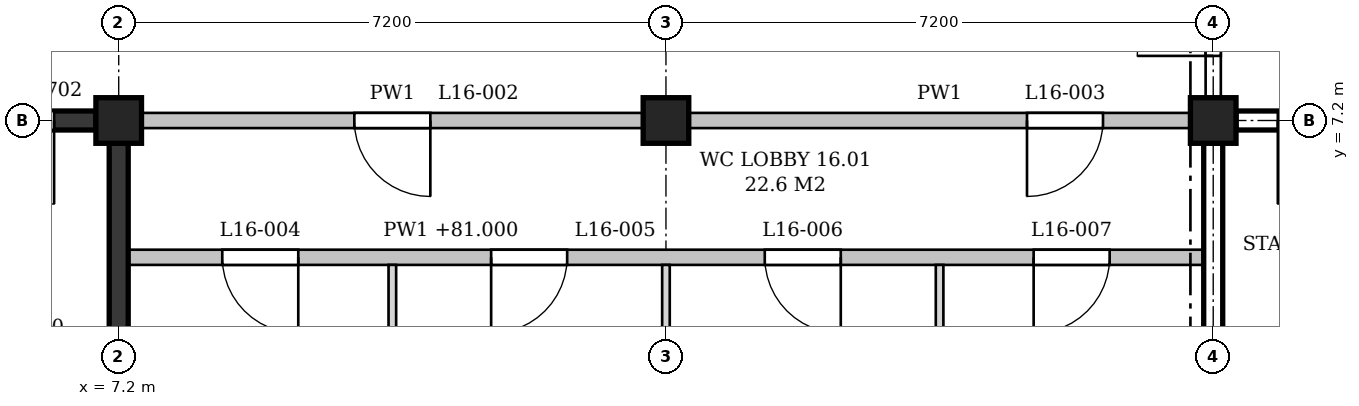
"""IFC4 building model, lengths in metres.
Left out: names, types, materials, properties, quantities, classifications, styles, units other than length and angle.
Written with IfcOpenShell. Run it as: python <this file> out.ifc"""

import sys

from ifc_helpers import new_model, si_unit, direction, frame, frame_2d, origin, origin_2d, place, context, subcontext, project, spatial, polyline, rectangle, outline, extrude, element, fill, save


model = new_model("IFC4")
c1 = context("Model", 3, precision=1e-05, world=origin(), true_north=direction((0.0, 1.0)))
c2 = subcontext(c1, "Body", "Model", "MODEL_VIEW")
j1 = project(units=[si_unit("LENGTHUNIT", "METRE"), si_unit("PLANEANGLEUNIT", "RADIAN")], contexts=[c1])
p1 = place(None, origin())
s1 = spatial("IfcSite", under=j1, at=p1, CompositionType="ELEMENT")
p2 = place(p1, origin())
s2 = spatial("IfcBuilding", under=s1, at=p2, CompositionType="ELEMENT")
p3 = place(p2, frame((0.0, 0.0, 76.8)))
s3 = spatial("IfcBuildingStorey", under=s2, at=p3, CompositionType="ELEMENT", Elevation=76.8)
for number, where, z_axis, x_axis in (
    (1, (7.2, 7.2, 0.0), (0.0, 0.0, 1.0), (1.0, 0.0, 0.0)),
    (2, (14.4, 7.2, 0.0), (0.0, 0.0, 1.0), (1.0, 0.0, 0.0)),
    (3, (21.6, 7.2, 0.0), (0.0, 0.0, 1.0), (1.0, 0.0, 0.0)),
):
    element("IfcColumn", number, at=place(p3, frame(where, z_axis=z_axis, x_axis=x_axis)), inside=s3, PredefinedType="COLUMN", context=c2, shape_type="SweptSolid", body=[
        extrude(rectangle(XDim=0.6, YDim=0.6, at=origin_2d()), origin(), (0.0, 0.0, 1.0), 4.5),
    ])
p4 = place(p3, frame((0.3, 7.2, 0.0), z_axis=(0.0, 0.0, 1.0), x_axis=(1.0, 0.0, 0.0)))
e4 = element("IfcWall", 4, at=p4, inside=s3, PredefinedType="SHEAR", context=c2, shape_type="SweptSolid", body=[
    extrude(rectangle(XDim=6.6, YDim=0.25, at=frame_2d((3.3, 0.0))), origin(), (0.0, 0.0, 1.0), 3.55),
])
p5 = place(p4, frame((4.95, 0.0, 0.0)))
e5 = element("IfcOpeningElement", 5, at=p5, cuts=e4, PredefinedType="OPENING", context=c2, shape_type="SweptSolid", body=[
    extrude(rectangle(XDim=1.1, YDim=2.1, at=frame_2d((0.55, 1.05))), frame((0.0, 0.135, 0.0), z_axis=(0.0, -1.0, 0.0), x_axis=(1.0, 0.0, 0.0)), (0.0, 0.0, 1.0), 0.27),
])
p6 = place(p3, frame((7.2, 0.3, 0.0), z_axis=(0.0, 0.0, 1.0), x_axis=(0.0, 1.0, 0.0)))
e6 = element("IfcWall", 6, at=p6, inside=s3, PredefinedType="SHEAR", context=c2, shape_type="SweptSolid", body=[
    extrude(rectangle(XDim=6.6, YDim=0.25, at=frame_2d((3.3, 0.0))), origin(), (0.0, 0.0, 1.0), 3.55),
])
p7 = place(p3, frame((21.9, 7.2, 0.0), z_axis=(0.0, 0.0, 1.0), x_axis=(1.0, 0.0, 0.0)))
e7 = element("IfcWall", 7, at=p7, inside=s3, PredefinedType="SHEAR", context=c2, shape_type="SweptSolid", body=[
    extrude(rectangle(XDim=6.6, YDim=0.25, at=frame_2d((3.3, 0.0))), origin(), (0.0, 0.0, 1.0), 3.55),
])
p8 = place(p7, frame((0.55, 0.0, 0.0)))
e8 = element("IfcOpeningElement", 8, at=p8, cuts=e7, PredefinedType="OPENING", context=c2, shape_type="SweptSolid", body=[
    extrude(rectangle(XDim=1.1, YDim=2.1, at=frame_2d((0.55, 1.05))), frame((0.0, 0.135, 0.0), z_axis=(0.0, -1.0, 0.0), x_axis=(1.0, 0.0, 0.0)), (0.0, 0.0, 1.0), 0.27),
])
p9 = place(p3, frame((21.6, 0.3, 0.0), z_axis=(0.0, 0.0, 1.0), x_axis=(0.0, 1.0, 0.0)))
e9 = element("IfcWall", 9, at=p9, inside=s3, PredefinedType="SHEAR", context=c2, shape_type="SweptSolid", body=[
    extrude(rectangle(XDim=6.6, YDim=0.25, at=frame_2d((3.3, 0.0))), origin(), (0.0, 0.0, 1.0), 3.55),
])
p10 = place(p3, frame((7.325, 5.4, 0.0), z_axis=(0.0, 0.0, 1.0), x_axis=(1.0, 0.0, 0.0)))
e10 = element("IfcWall", 10, at=p10, inside=s3, PredefinedType="PARTITIONING", context=c2, shape_type="SweptSolid", body=[
    extrude(outline(polyline([(0.0, 0.0), (14.15, 0.0), (14.15, 3.55), (14.05, 3.55), (14.05, 4.2), (7.3, 4.2), (7.3, 3.55), (6.85, 3.55), (6.85, 4.2), (0.1, 4.2), (0.1, 3.55), (0.0, 3.55), (0.0, 0.0)])), frame((0.0, 0.1, 0.0), z_axis=(0.0, -1.0, 0.0), x_axis=(1.0, 0.0, 0.0)), (0.0, 0.0, 1.0), 0.2),
])
p11 = place(p10, frame((1.238, 0.0, 0.0)))
e11 = element("IfcOpeningElement", 11, at=p11, cuts=e10, PredefinedType="OPENING", context=c2, shape_type="SweptSolid", body=[
    extrude(rectangle(XDim=1.0, YDim=2.1, at=frame_2d((0.5, 1.05))), frame((0.0, 0.11, 0.0), z_axis=(0.0, -1.0, 0.0), x_axis=(1.0, 0.0, 0.0)), (0.0, 0.0, 1.0), 0.22),
])
p12 = place(p10, frame((4.775, 0.0, 0.0)))
e12 = element("IfcOpeningElement", 12, at=p12, cuts=e10, PredefinedType="OPENING", context=c2, shape_type="SweptSolid", body=[
    extrude(rectangle(XDim=1.0, YDim=2.1, at=frame_2d((0.5, 1.05))), frame((0.0, 0.11, 0.0), z_axis=(0.0, -1.0, 0.0), x_axis=(1.0, 0.0, 0.0)), (0.0, 0.0, 1.0), 0.22),
])
p13 = place(p10, frame((8.375, 0.0, 0.0)))
e13 = element("IfcOpeningElement", 13, at=p13, cuts=e10, PredefinedType="OPENING", context=c2, shape_type="SweptSolid", body=[
    extrude(rectangle(XDim=1.0, YDim=2.1, at=frame_2d((0.5, 1.05))), frame((0.0, 0.11, 0.0), z_axis=(0.0, -1.0, 0.0), x_axis=(1.0, 0.0, 0.0)), (0.0, 0.0, 1.0), 0.22),
])
p14 = place(p10, frame((11.913, 0.0, 0.0)))
e14 = element("IfcOpeningElement", 14, at=p14, cuts=e10, PredefinedType="OPENING", context=c2, shape_type="SweptSolid", body=[
    extrude(rectangle(XDim=1.0, YDim=2.1, at=frame_2d((0.5, 1.05))), frame((0.0, 0.11, 0.0), z_axis=(0.0, -1.0, 0.0), x_axis=(1.0, 0.0, 0.0)), (0.0, 0.0, 1.0), 0.22),
])
p15 = place(p3, frame((7.5, 7.2, 0.0), z_axis=(0.0, 0.0, 1.0), x_axis=(1.0, 0.0, 0.0)))
e15 = element("IfcWall", 15, at=p15, inside=s3, PredefinedType="PARTITIONING", context=c2, shape_type="SweptSolid", body=[
    extrude(rectangle(XDim=6.6, YDim=0.2, at=frame_2d((3.3, 0.0))), origin(), (0.0, 0.0, 1.0), 3.55),
])
p16 = place(p15, frame((2.8, 0.0, 0.0)))
e16 = element("IfcOpeningElement", 16, at=p16, cuts=e15, PredefinedType="OPENING", context=c2, shape_type="SweptSolid", body=[
    extrude(rectangle(XDim=1.0, YDim=2.1, at=frame_2d((0.5, 1.05))), frame((0.0, 0.11, 0.0), z_axis=(0.0, -1.0, 0.0), x_axis=(1.0, 0.0, 0.0)), (0.0, 0.0, 1.0), 0.22),
])
p17 = place(p3, frame((14.7, 7.2, 0.0), z_axis=(0.0, 0.0, 1.0), x_axis=(1.0, 0.0, 0.0)))
e17 = element("IfcWall", 17, at=p17, inside=s3, PredefinedType="PARTITIONING", context=c2, shape_type="SweptSolid", body=[
    extrude(rectangle(XDim=6.6, YDim=0.2, at=frame_2d((3.3, 0.0))), origin(), (0.0, 0.0, 1.0), 3.55),
])
p18 = place(p17, frame((4.45, 0.0, 0.0)))
e18 = element("IfcOpeningElement", 18, at=p18, cuts=e17, PredefinedType="OPENING", context=c2, shape_type="SweptSolid", body=[
    extrude(rectangle(XDim=1.0, YDim=2.1, at=frame_2d((0.5, 1.05))), frame((0.0, 0.11, 0.0), z_axis=(0.0, -1.0, 0.0), x_axis=(1.0, 0.0, 0.0)), (0.0, 0.0, 1.0), 0.22),
])
p19 = place(p3, frame((10.8, 0.15, 0.0), z_axis=(0.0, 0.0, 1.0), x_axis=(0.0, 1.0, 0.0)))
e19 = element("IfcWall", 19, at=p19, inside=s3, PredefinedType="PARTITIONING", context=c2, shape_type="SweptSolid", body=[
    extrude(rectangle(XDim=5.15, YDim=0.1, at=frame_2d((2.575, 0.0))), origin(), (0.0, 0.0, 1.0), 3.55),
])
p20 = place(p3, frame((14.4, 0.3, 0.0), z_axis=(0.0, 0.0, 1.0), x_axis=(0.0, 1.0, 0.0)))
e20 = element("IfcWall", 20, at=p20, inside=s3, PredefinedType="PARTITIONING", context=c2, shape_type="SweptSolid", body=[
    extrude(rectangle(XDim=5.0, YDim=0.1, at=frame_2d((2.5, 0.0))), origin(), (0.0, 0.0, 1.0), 3.55),
])
p21 = place(p3, frame((18.0, 0.15, 0.0), z_axis=(0.0, 0.0, 1.0), x_axis=(0.0, 1.0, 0.0)))
e21 = element("IfcWall", 21, at=p21, inside=s3, PredefinedType="PARTITIONING", context=c2, shape_type="SweptSolid", body=[
    extrude(rectangle(XDim=5.15, YDim=0.1, at=frame_2d((2.575, 0.0))), origin(), (0.0, 0.0, 1.0), 3.55),
])
p22 = place(p3, frame((21.6, 7.5, 0.0), z_axis=(0.0, 0.0, 1.0), x_axis=(0.0, 1.0, 0.0)))
e22 = element("IfcWall", 22, at=p22, inside=s3, PredefinedType="PARTITIONING", context=c2, shape_type="SweptSolid", body=[
    extrude(rectangle(XDim=2.825, YDim=0.2, at=frame_2d((1.413, 0.0))), origin(), (0.0, 0.0, 1.0), 3.55),
])
p23 = place(p22, frame((0.55, 0.0, 0.0)))
e23 = element("IfcOpeningElement", 23, at=p23, cuts=e22, PredefinedType="OPENING", context=c2, shape_type="SweptSolid", body=[
    extrude(rectangle(XDim=1.0, YDim=2.1, at=frame_2d((0.5, 1.05))), frame((0.0, 0.11, 0.0), z_axis=(0.0, -1.0, 0.0), x_axis=(1.0, 0.0, 0.0)), (0.0, 0.0, 1.0), 0.22),
])
p24 = place(p5, frame((1.1, 0.0, 0.0), z_axis=(0.0, 0.0, 1.0), x_axis=(-1.0, 0.0, 0.0)))
e24 = element("IfcDoor", 24, at=p24, inside=s3, OperationType="SINGLE_SWING_LEFT", PredefinedType="DOOR", context=c2, shape_type="SweptSolid", body=[
    extrude(rectangle(XDim=1.1, YDim=2.1, at=frame_2d((0.55, 1.05))), frame((0.0, 0.025, 0.0), z_axis=(0.0, -1.0, 0.0), x_axis=(1.0, 0.0, 0.0)), (0.0, 0.0, 1.0), 0.05),
])
fill(e5, e24)
p25 = place(p8, frame((1.1, 0.0, 0.0), z_axis=(0.0, 0.0, 1.0), x_axis=(-1.0, 0.0, 0.0)))
e25 = element("IfcDoor", 25, at=p25, inside=s3, OperationType="SINGLE_SWING_RIGHT", PredefinedType="DOOR", context=c2, shape_type="SweptSolid", body=[
    extrude(rectangle(XDim=1.1, YDim=2.1, at=frame_2d((0.55, 1.05))), frame((0.0, 0.025, 0.0), z_axis=(0.0, -1.0, 0.0), x_axis=(1.0, 0.0, 0.0)), (0.0, 0.0, 1.0), 0.05),
])
fill(e8, e25)
p26 = place(p23, origin())
e26 = element("IfcDoor", 26, at=p26, inside=s3, OperationType="SINGLE_SWING_LEFT", PredefinedType="DOOR", context=c2, shape_type="SweptSolid", body=[
    extrude(rectangle(XDim=1.0, YDim=2.1, at=frame_2d((0.5, 1.05))), frame((0.0, 0.025, 0.0), z_axis=(0.0, -1.0, 0.0), x_axis=(1.0, 0.0, 0.0)), (0.0, 0.0, 1.0), 0.05),
])
fill(e23, e26)
p27 = place(p16, frame((1.0, 0.0, 0.0), z_axis=(0.0, 0.0, 1.0), x_axis=(-1.0, 0.0, 0.0)))
e27 = element("IfcDoor", 27, at=p27, inside=s3, OperationType="SINGLE_SWING_LEFT", PredefinedType="DOOR", context=c2, shape_type="SweptSolid", body=[
    extrude(rectangle(XDim=1.0, YDim=2.1, at=frame_2d((0.5, 1.05))), frame((0.0, 0.025, 0.0), z_axis=(0.0, -1.0, 0.0), x_axis=(1.0, 0.0, 0.0)), (0.0, 0.0, 1.0), 0.05),
])
fill(e16, e27)
p28 = place(p18, frame((1.0, 0.0, 0.0), z_axis=(0.0, 0.0, 1.0), x_axis=(-1.0, 0.0, 0.0)))
e28 = element("IfcDoor", 28, at=p28, inside=s3, OperationType="SINGLE_SWING_RIGHT", PredefinedType="DOOR", context=c2, shape_type="SweptSolid", body=[
    extrude(rectangle(XDim=1.0, YDim=2.1, at=frame_2d((0.5, 1.05))), frame((0.0, 0.025, 0.0), z_axis=(0.0, -1.0, 0.0), x_axis=(1.0, 0.0, 0.0)), (0.0, 0.0, 1.0), 0.05),
])
fill(e18, e28)
p29 = place(p11, frame((1.0, 0.0, 0.0), z_axis=(0.0, 0.0, 1.0), x_axis=(-1.0, 0.0, 0.0)))
e29 = element("IfcDoor", 29, at=p29, inside=s3, OperationType="SINGLE_SWING_LEFT", PredefinedType="DOOR", context=c2, shape_type="SweptSolid", body=[
    extrude(rectangle(XDim=1.0, YDim=2.1, at=frame_2d((0.5, 1.05))), frame((0.0, 0.025, 0.0), z_axis=(0.0, -1.0, 0.0), x_axis=(1.0, 0.0, 0.0)), (0.0, 0.0, 1.0), 0.05),
])
fill(e11, e29)
p30 = place(p12, frame((1.0, 0.0, 0.0), z_axis=(0.0, 0.0, 1.0), x_axis=(-1.0, 0.0, 0.0)))
e30 = element("IfcDoor", 30, at=p30, inside=s3, OperationType="SINGLE_SWING_RIGHT", PredefinedType="DOOR", context=c2, shape_type="SweptSolid", body=[
    extrude(rectangle(XDim=1.0, YDim=2.1, at=frame_2d((0.5, 1.05))), frame((0.0, 0.025, 0.0), z_axis=(0.0, -1.0, 0.0), x_axis=(1.0, 0.0, 0.0)), (0.0, 0.0, 1.0), 0.05),
])
fill(e12, e30)
p31 = place(p13, frame((1.0, 0.0, 0.0), z_axis=(0.0, 0.0, 1.0), x_axis=(-1.0, 0.0, 0.0)))
e31 = element("IfcDoor", 31, at=p31, inside=s3, OperationType="SINGLE_SWING_LEFT", PredefinedType="DOOR", context=c2, shape_type="SweptSolid", body=[
    extrude(rectangle(XDim=1.0, YDim=2.1, at=frame_2d((0.5, 1.05))), frame((0.0, 0.025, 0.0), z_axis=(0.0, -1.0, 0.0), x_axis=(1.0, 0.0, 0.0)), (0.0, 0.0, 1.0), 0.05),
])
fill(e13, e31)
p32 = place(p14, frame((1.0, 0.0, 0.0), z_axis=(0.0, 0.0, 1.0), x_axis=(-1.0, 0.0, 0.0)))
e32 = element("IfcDoor", 32, at=p32, inside=s3, OperationType="SINGLE_SWING_RIGHT", PredefinedType="DOOR", context=c2, shape_type="SweptSolid", body=[
    extrude(rectangle(XDim=1.0, YDim=2.1, at=frame_2d((0.5, 1.05))), frame((0.0, 0.025, 0.0), z_axis=(0.0, -1.0, 0.0), x_axis=(1.0, 0.0, 0.0)), (0.0, 0.0, 1.0), 0.05),
])
fill(e14, e32)
save(model, sys.argv[1])
